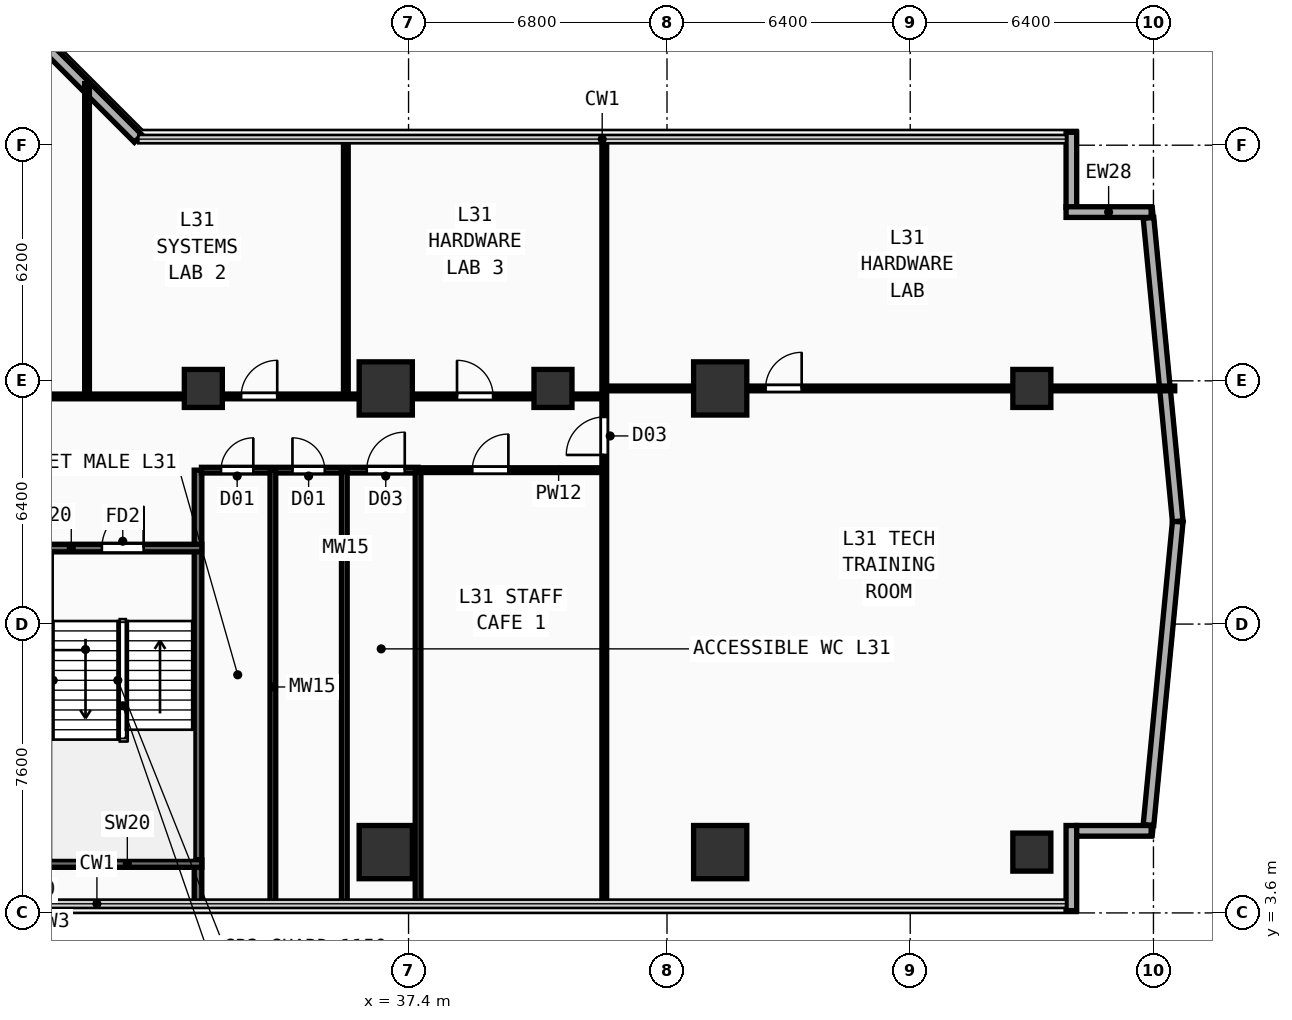
"""IFC4 building model, lengths in metres.
Left out: names, types, materials, properties, quantities, classifications, styles, units other than length and angle.
Written with IfcOpenShell. Run it as: python <this file> out.ifc"""

import sys

from ifc_helpers import new_model, si_unit, direction, frame, frame_2d, origin, origin_2d, place, context, subcontext, project, spatial, rectangle, extrude, element, fill, save


model = new_model("IFC4")
c1 = context("Model", 3, precision=1e-05, world=origin(), true_north=direction((0.0, 1.0)))
c2 = subcontext(c1, "Body", "Model", "MODEL_VIEW")
j1 = project(units=[si_unit("LENGTHUNIT", "METRE"), si_unit("PLANEANGLEUNIT", "RADIAN")], contexts=[c1])
p1 = place(None, origin())
s1 = spatial("IfcSite", under=j1, at=p1, CompositionType="ELEMENT")
p2 = place(p1, origin())
s2 = spatial("IfcBuilding", under=s1, at=p2, CompositionType="ELEMENT")
p3 = place(p2, frame((0.0, 0.0, 122.1)))
s3 = spatial("IfcBuildingStorey", under=s2, at=p3, CompositionType="ELEMENT", Elevation=122.1)
for number, where, z_axis, x_axis in (
    (1, (36.8, 5.2, 0.0), (0.0, 0.0, 1.0), (1.0, 0.0, 0.0)),
    (2, (45.6, 5.2, 0.0), (0.0, 0.0, 1.0), (1.0, 0.0, 0.0)),
    (3, (36.8, 17.4, 0.0), (0.0, 0.0, 1.0), (1.0, 0.0, 0.0)),
    (4, (45.6, 17.4, 0.0), (0.0, 0.0, 1.0), (1.0, 0.0, 0.0)),
):
    element("IfcColumn", number, at=place(p3, frame(where, z_axis=z_axis, x_axis=x_axis)), inside=s3, PredefinedType="COLUMN", context=c2, shape_type="SweptSolid", body=[
        extrude(rectangle(XDim=1.4, YDim=1.4, at=origin_2d()), origin(), (0.0, 0.0, 1.0), 3.54),
    ])
for number, where, z_axis, x_axis in (
    (5, (53.8, 5.2, 0.0), (0.0, 0.0, 1.0), (1.0, 0.0, 0.0)),
    (6, (53.8, 17.4, 0.0), (0.0, 0.0, 1.0), (1.0, 0.0, 0.0)),
    (7, (32.0, 17.4, 0.0), (0.0, 0.0, 1.0), (1.0, 0.0, 0.0)),
    (8, (41.2, 17.4, 0.0), (0.0, 0.0, 1.0), (1.0, 0.0, 0.0)),
):
    element("IfcColumn", number, at=place(p3, frame(where, z_axis=z_axis, x_axis=x_axis)), inside=s3, PredefinedType="COLUMN", context=c2, shape_type="SweptSolid", body=[
        extrude(rectangle(XDim=1.0, YDim=1.0, at=origin_2d()), origin(), (0.0, 0.0, 1.0), 3.54),
    ])
p4 = place(p3, frame((54.84, 3.66, 0.0), z_axis=(0.0, 0.0, 1.0), x_axis=(0.0, 1.0, 0.0)))
e9 = element("IfcWall", 9, at=p4, inside=s3, PredefinedType="SOLIDWALL", context=c2, shape_type="SweptSolid", body=[
    extrude(rectangle(XDim=2.24, YDim=0.28, at=frame_2d((1.12, 0.0))), origin(), (0.0, 0.0, 1.0), 3.54),
])
p5 = place(p3, frame((54.98, 5.76, 0.0), z_axis=(0.0, 0.0, 1.0), x_axis=(1.0, 0.0, 0.0)))
e10 = element("IfcWall", 10, at=p5, inside=s3, PredefinedType="SOLIDWALL", context=c2, shape_type="SweptSolid", body=[
    extrude(rectangle(XDim=1.96, YDim=0.28, at=frame_2d((0.98, 0.0))), origin(), (0.0, 0.0, 1.0), 3.54),
])
p6 = place(p3, frame((54.84, 22.165, 0.0), z_axis=(0.0, 0.0, 1.0), x_axis=(0.0, 1.0, 0.0)))
e11 = element("IfcWall", 11, at=p6, inside=s3, PredefinedType="SOLIDWALL", context=c2, shape_type="SweptSolid", body=[
    extrude(rectangle(XDim=1.975, YDim=0.28, at=frame_2d((0.987, 0.0))), origin(), (0.0, 0.0, 1.0), 3.54),
])
p7 = place(p3, frame((54.7, 22.04, 0.0), z_axis=(0.0, 0.0, 1.0), x_axis=(1.0, 0.0, 0.0)))
e12 = element("IfcWall", 12, at=p7, inside=s3, PredefinedType="SOLIDWALL", context=c2, shape_type="SweptSolid", body=[
    extrude(rectangle(XDim=2.24, YDim=0.28, at=frame_2d((1.12, 0.0))), origin(), (0.0, 0.0, 1.0), 3.54),
])
p8 = place(p3, frame((30.285, 23.975, 0.0), z_axis=(0.0, 0.0, 1.0), x_axis=(-0.707106781187, 0.707106781187, 0.0)))
e13 = element("IfcWall", 13, at=p8, inside=s3, PredefinedType="SOLIDWALL", context=c2, shape_type="SweptSolid", body=[
    extrude(rectangle(XDim=9.207, YDim=0.28, at=frame_2d((4.603, 0.0))), origin(), (0.0, 0.0, 1.0), 3.54),
])
for number, where, z_axis, x_axis in (
    (14, (56.869, 5.914, 0.0), (0.0, 0.0, 1.0), (0.096, 0.995, 0.0)),
    (15, (57.639, 13.905, 0.0), (0.0, 0.0, 1.0), (-0.096, 0.995, 0.0)),
):
    element("IfcWall", number, at=place(p3, frame(where, z_axis=z_axis, x_axis=x_axis)), inside=s3, PredefinedType="SOLIDWALL", context=c2, shape_type="SweptSolid", body=[
        extrude(rectangle(XDim=8.019, YDim=0.28, at=frame_2d((4.009, 0.0))), origin(), (0.0, 0.0, 1.0), 3.54),
    ])
p9 = place(p3, frame((31.86, 3.84, 0.0), z_axis=(0.0, 0.0, 1.0), x_axis=(0.0, 1.0, 0.0)))
e16 = element("IfcWall", 16, at=p9, inside=s3, PredefinedType="SHEAR", context=c2, shape_type="SweptSolid", body=[
    extrude(rectangle(XDim=11.41, YDim=0.2, at=frame_2d((5.705, 0.0))), origin(), (0.0, 0.0, 1.0), 3.54),
])
p10 = place(p3, frame((27.8, 4.9, 0.0), z_axis=(0.0, 0.0, 1.0), x_axis=(1.0, 0.0, 0.0)))
e17 = element("IfcWall", 17, at=p10, inside=s3, PredefinedType="SHEAR", context=c2, shape_type="SweptSolid", body=[
    extrude(rectangle(XDim=4.16, YDim=0.2, at=frame_2d((2.08, 0.0))), origin(), (0.0, 0.0, 1.0), 3.54),
])
p11 = place(p3, frame((27.8, 13.2, 0.0), z_axis=(0.0, 0.0, 1.0), x_axis=(1.0, 0.0, 0.0)))
e18 = element("IfcWall", 18, at=p11, inside=s3, PredefinedType="SHEAR", context=c2, shape_type="SweptSolid", body=[
    extrude(rectangle(XDim=4.16, YDim=0.2, at=frame_2d((2.08, 0.0))), origin(), (0.0, 0.0, 1.0), 3.54),
])
p12 = place(p11, frame((1.53, 0.0, 0.0)))
e19 = element("IfcOpeningElement", 19, at=p12, cuts=e18, PredefinedType="OPENING", context=c2, shape_type="SweptSolid", body=[
    extrude(rectangle(XDim=1.1, YDim=2.2, at=frame_2d((0.55, 1.1))), frame((0.0, 0.11, 0.0), z_axis=(0.0, -1.0, 0.0), x_axis=(1.0, 0.0, 0.0)), (0.0, 0.0, 1.0), 0.22),
])
p13 = place(p3, frame((31.95, 15.25, 0.0), z_axis=(0.0, 0.0, 1.0), x_axis=(1.0, 0.0, 0.0)))
e20 = element("IfcWall", 20, at=p13, inside=s3, PredefinedType="PLUMBINGWALL", context=c2, shape_type="SweptSolid", body=[
    extrude(rectangle(XDim=5.7, YDim=0.15, at=frame_2d((2.85, 0.0))), origin(), (0.0, 0.0, 1.0), 3.09),
])
p14 = place(p13, frame((0.515, 0.0, 0.0)))
e21 = element("IfcOpeningElement", 21, at=p14, cuts=e20, PredefinedType="OPENING", context=c2, shape_type="SweptSolid", body=[
    extrude(rectangle(XDim=0.85, YDim=2.15, at=frame_2d((0.425, 1.075))), frame((0.0, 0.085, 0.0), z_axis=(0.0, -1.0, 0.0), x_axis=(1.0, 0.0, 0.0)), (0.0, 0.0, 1.0), 0.17),
])
p15 = place(p13, frame((2.395, 0.0, 0.0)))
e22 = element("IfcOpeningElement", 22, at=p15, cuts=e20, PredefinedType="OPENING", context=c2, shape_type="SweptSolid", body=[
    extrude(rectangle(XDim=0.85, YDim=2.15, at=frame_2d((0.425, 1.075))), frame((0.0, 0.085, 0.0), z_axis=(0.0, -1.0, 0.0), x_axis=(1.0, 0.0, 0.0)), (0.0, 0.0, 1.0), 0.17),
])
p16 = place(p13, frame((4.35, 0.0, 0.0)))
e23 = element("IfcOpeningElement", 23, at=p16, cuts=e20, PredefinedType="OPENING", context=c2, shape_type="SweptSolid", body=[
    extrude(rectangle(XDim=1.0, YDim=2.2, at=frame_2d((0.5, 1.1))), frame((0.0, 0.085, 0.0), z_axis=(0.0, -1.0, 0.0), x_axis=(1.0, 0.0, 0.0)), (0.0, 0.0, 1.0), 0.17),
])
for number, where, z_axis, x_axis in (
    (24, (33.83, 3.84, 0.0), (0.0, 0.0, 1.0), (0.0, 1.0, 0.0)),
    (25, (35.71, 3.84, 0.0), (0.0, 0.0, 1.0), (0.0, 1.0, 0.0)),
    (26, (37.65, 3.84, 0.0), (0.0, 0.0, 1.0), (0.0, 1.0, 0.0)),
):
    element("IfcWall", number, at=place(p3, frame(where, z_axis=z_axis, x_axis=x_axis)), inside=s3, PredefinedType="PLUMBINGWALL", context=c2, shape_type="SweptSolid", body=[
        extrude(rectangle(XDim=11.41, YDim=0.15, at=frame_2d((5.705, 0.0))), origin(), (0.0, 0.0, 1.0), 3.54),
    ])
p17 = place(p3, frame((37.65, 15.25, 0.0), z_axis=(0.0, 0.0, 1.0), x_axis=(1.0, 0.0, 0.0)))
e27 = element("IfcWall", 27, at=p17, inside=s3, PredefinedType="PARTITIONING", context=c2, shape_type="SweptSolid", body=[
    extrude(rectangle(XDim=4.9, YDim=0.125, at=frame_2d((2.45, 0.0))), origin(), (0.0, 0.0, 1.0), 3.09),
])
p18 = place(p17, frame((1.427, 0.0, 0.0)))
e28 = element("IfcOpeningElement", 28, at=p18, cuts=e27, PredefinedType="OPENING", context=c2, shape_type="SweptSolid", body=[
    extrude(rectangle(XDim=0.95, YDim=2.15, at=frame_2d((0.475, 1.075))), frame((0.0, 0.073, 0.0), z_axis=(0.0, -1.0, 0.0), x_axis=(1.0, 0.0, 0.0)), (0.0, 0.0, 1.0), 0.145),
])
p19 = place(p3, frame((42.55, 3.84, 0.0), z_axis=(0.0, 0.0, 1.0), x_axis=(0.0, 1.0, 0.0)))
e29 = element("IfcWall", 29, at=p19, inside=s3, PredefinedType="PARTITIONING", context=c2, shape_type="SweptSolid", body=[
    extrude(rectangle(XDim=20.12, YDim=0.125, at=frame_2d((10.06, 0.0))), origin(), (0.0, 0.0, 1.0), 3.54),
])
p20 = place(p19, frame((11.81, 0.0, 0.0)))
e30 = element("IfcOpeningElement", 30, at=p20, cuts=e29, PredefinedType="OPENING", context=c2, shape_type="SweptSolid", body=[
    extrude(rectangle(XDim=1.0, YDim=2.2, at=frame_2d((0.5, 1.1))), frame((0.0, 0.073, 0.0), z_axis=(0.0, -1.0, 0.0), x_axis=(1.0, 0.0, 0.0)), (0.0, 0.0, 1.0), 0.145),
])
p21 = place(p3, frame((42.55, 17.4, 0.0), z_axis=(0.0, 0.0, 1.0), x_axis=(1.0, 0.0, 0.0)))
e31 = element("IfcWall", 31, at=p21, inside=s3, PredefinedType="PARTITIONING", context=c2, shape_type="SweptSolid", body=[
    extrude(rectangle(XDim=15.01, YDim=0.125, at=frame_2d((7.505, 0.0))), origin(), (0.0, 0.0, 1.0), 3.24),
])
p22 = place(p21, frame((4.244, 0.0, 0.0)))
e32 = element("IfcOpeningElement", 32, at=p22, cuts=e31, PredefinedType="OPENING", context=c2, shape_type="SweptSolid", body=[
    extrude(rectangle(XDim=0.95, YDim=2.15, at=frame_2d((0.475, 1.075))), frame((0.0, 0.073, 0.0), z_axis=(0.0, -1.0, 0.0), x_axis=(1.0, 0.0, 0.0)), (0.0, 0.0, 1.0), 0.145),
])
p23 = place(p3, frame((23.65, 17.19, 0.0), z_axis=(0.0, 0.0, 1.0), x_axis=(1.0, 0.0, 0.0)))
e33 = element("IfcWall", 33, at=p23, inside=s3, PredefinedType="PARTITIONING", context=c2, shape_type="SweptSolid", body=[
    extrude(rectangle(XDim=18.9, YDim=0.125, at=frame_2d((9.45, 0.0))), origin(), (0.0, 0.0, 1.0), 3.24),
])
p24 = place(p23, frame((1.533, 0.0, 0.0)))
e34 = element("IfcOpeningElement", 34, at=p24, cuts=e33, PredefinedType="OPENING", context=c2, shape_type="SweptSolid", body=[
    extrude(rectangle(XDim=0.95, YDim=2.15, at=frame_2d((0.475, 1.075))), frame((0.0, 0.073, 0.0), z_axis=(0.0, -1.0, 0.0), x_axis=(1.0, 0.0, 0.0)), (0.0, 0.0, 1.0), 0.145),
])
p25 = place(p23, frame((9.344, 0.0, 0.0)))
e35 = element("IfcOpeningElement", 35, at=p25, cuts=e33, PredefinedType="OPENING", context=c2, shape_type="SweptSolid", body=[
    extrude(rectangle(XDim=0.95, YDim=2.15, at=frame_2d((0.475, 1.075))), frame((0.0, 0.073, 0.0), z_axis=(0.0, -1.0, 0.0), x_axis=(1.0, 0.0, 0.0)), (0.0, 0.0, 1.0), 0.145),
])
p26 = place(p23, frame((15.025, 0.0, 0.0)))
e36 = element("IfcOpeningElement", 36, at=p26, cuts=e33, PredefinedType="OPENING", context=c2, shape_type="SweptSolid", body=[
    extrude(rectangle(XDim=0.95, YDim=2.15, at=frame_2d((0.475, 1.075))), frame((0.0, 0.073, 0.0), z_axis=(0.0, -1.0, 0.0), x_axis=(1.0, 0.0, 0.0)), (0.0, 0.0, 1.0), 0.145),
])
p27 = place(p3, frame((28.94, 17.19, 0.0), z_axis=(0.0, 0.0, 1.0), x_axis=(0.0, 1.0, 0.0)))
e37 = element("IfcWall", 37, at=p27, inside=s3, PredefinedType="PARTITIONING", context=c2, shape_type="SweptSolid", body=[
    extrude(rectangle(XDim=8.23, YDim=0.125, at=frame_2d((4.115, 0.0))), origin(), (0.0, 0.0, 1.0), 3.54),
])
p28 = place(p3, frame((35.75, 17.19, 0.0), z_axis=(0.0, 0.0, 1.0), x_axis=(0.0, 1.0, 0.0)))
e38 = element("IfcWall", 38, at=p28, inside=s3, PredefinedType="PARTITIONING", context=c2, shape_type="SweptSolid", body=[
    extrude(rectangle(XDim=6.77, YDim=0.125, at=frame_2d((3.385, 0.0))), origin(), (0.0, 0.0, 1.0), 3.54),
])
p29 = place(p12, frame((1.1, 0.0, 0.0), z_axis=(0.0, 0.0, 1.0), x_axis=(-1.0, 0.0, 0.0)))
e39 = element("IfcDoor", 39, at=p29, inside=s3, OperationType="SINGLE_SWING_LEFT", PredefinedType="DOOR", context=c2, shape_type="SweptSolid", body=[
    extrude(rectangle(XDim=1.1, YDim=2.2, at=frame_2d((0.55, 1.1))), frame((0.0, 0.025, 0.0), z_axis=(0.0, -1.0, 0.0), x_axis=(1.0, 0.0, 0.0)), (0.0, 0.0, 1.0), 0.05),
])
fill(e19, e39)
p30 = place(p14, origin())
e40 = element("IfcDoor", 40, at=p30, inside=s3, OperationType="SINGLE_SWING_RIGHT", PredefinedType="DOOR", context=c2, shape_type="SweptSolid", body=[
    extrude(rectangle(XDim=0.85, YDim=2.15, at=frame_2d((0.425, 1.075))), frame((0.0, 0.025, 0.0), z_axis=(0.0, -1.0, 0.0), x_axis=(1.0, 0.0, 0.0)), (0.0, 0.0, 1.0), 0.05),
])
fill(e21, e40)
p31 = place(p15, origin())
e41 = element("IfcDoor", 41, at=p31, inside=s3, OperationType="SINGLE_SWING_LEFT", PredefinedType="DOOR", context=c2, shape_type="SweptSolid", body=[
    extrude(rectangle(XDim=0.85, YDim=2.15, at=frame_2d((0.425, 1.075))), frame((0.0, 0.025, 0.0), z_axis=(0.0, -1.0, 0.0), x_axis=(1.0, 0.0, 0.0)), (0.0, 0.0, 1.0), 0.05),
])
fill(e22, e41)
p32 = place(p16, origin())
e42 = element("IfcDoor", 42, at=p32, inside=s3, OperationType="SINGLE_SWING_RIGHT", PredefinedType="DOOR", context=c2, shape_type="SweptSolid", body=[
    extrude(rectangle(XDim=1.0, YDim=2.2, at=frame_2d((0.5, 1.1))), frame((0.0, 0.025, 0.0), z_axis=(0.0, -1.0, 0.0), x_axis=(1.0, 0.0, 0.0)), (0.0, 0.0, 1.0), 0.05),
])
fill(e23, e42)
p33 = place(p18, origin())
e43 = element("IfcDoor", 43, at=p33, inside=s3, OperationType="SINGLE_SWING_RIGHT", PredefinedType="DOOR", context=c2, shape_type="SweptSolid", body=[
    extrude(rectangle(XDim=0.95, YDim=2.15, at=frame_2d((0.475, 1.075))), frame((0.0, 0.025, 0.0), z_axis=(0.0, -1.0, 0.0), x_axis=(1.0, 0.0, 0.0)), (0.0, 0.0, 1.0), 0.05),
])
fill(e28, e43)
p34 = place(p20, origin())
e44 = element("IfcDoor", 44, at=p34, inside=s3, OperationType="SINGLE_SWING_LEFT", PredefinedType="DOOR", context=c2, shape_type="SweptSolid", body=[
    extrude(rectangle(XDim=1.0, YDim=2.2, at=frame_2d((0.5, 1.1))), frame((0.0, 0.025, 0.0), z_axis=(0.0, -1.0, 0.0), x_axis=(1.0, 0.0, 0.0)), (0.0, 0.0, 1.0), 0.05),
])
fill(e30, e44)
p35 = place(p22, origin())
e45 = element("IfcDoor", 45, at=p35, inside=s3, OperationType="SINGLE_SWING_RIGHT", PredefinedType="DOOR", context=c2, shape_type="SweptSolid", body=[
    extrude(rectangle(XDim=0.95, YDim=2.15, at=frame_2d((0.475, 1.075))), frame((0.0, 0.025, 0.0), z_axis=(0.0, -1.0, 0.0), x_axis=(1.0, 0.0, 0.0)), (0.0, 0.0, 1.0), 0.05),
])
fill(e32, e45)
p36 = place(p25, origin())
e46 = element("IfcDoor", 46, at=p36, inside=s3, OperationType="SINGLE_SWING_RIGHT", PredefinedType="DOOR", context=c2, shape_type="SweptSolid", body=[
    extrude(rectangle(XDim=0.95, YDim=2.15, at=frame_2d((0.475, 1.075))), frame((0.0, 0.025, 0.0), z_axis=(0.0, -1.0, 0.0), x_axis=(1.0, 0.0, 0.0)), (0.0, 0.0, 1.0), 0.05),
])
fill(e35, e46)
p37 = place(p26, origin())
e47 = element("IfcDoor", 47, at=p37, inside=s3, OperationType="SINGLE_SWING_LEFT", PredefinedType="DOOR", context=c2, shape_type="SweptSolid", body=[
    extrude(rectangle(XDim=0.95, YDim=2.15, at=frame_2d((0.475, 1.075))), frame((0.0, 0.025, 0.0), z_axis=(0.0, -1.0, 0.0), x_axis=(1.0, 0.0, 0.0)), (0.0, 0.0, 1.0), 0.05),
])
fill(e36, e47)
save(model, sys.argv[1])
